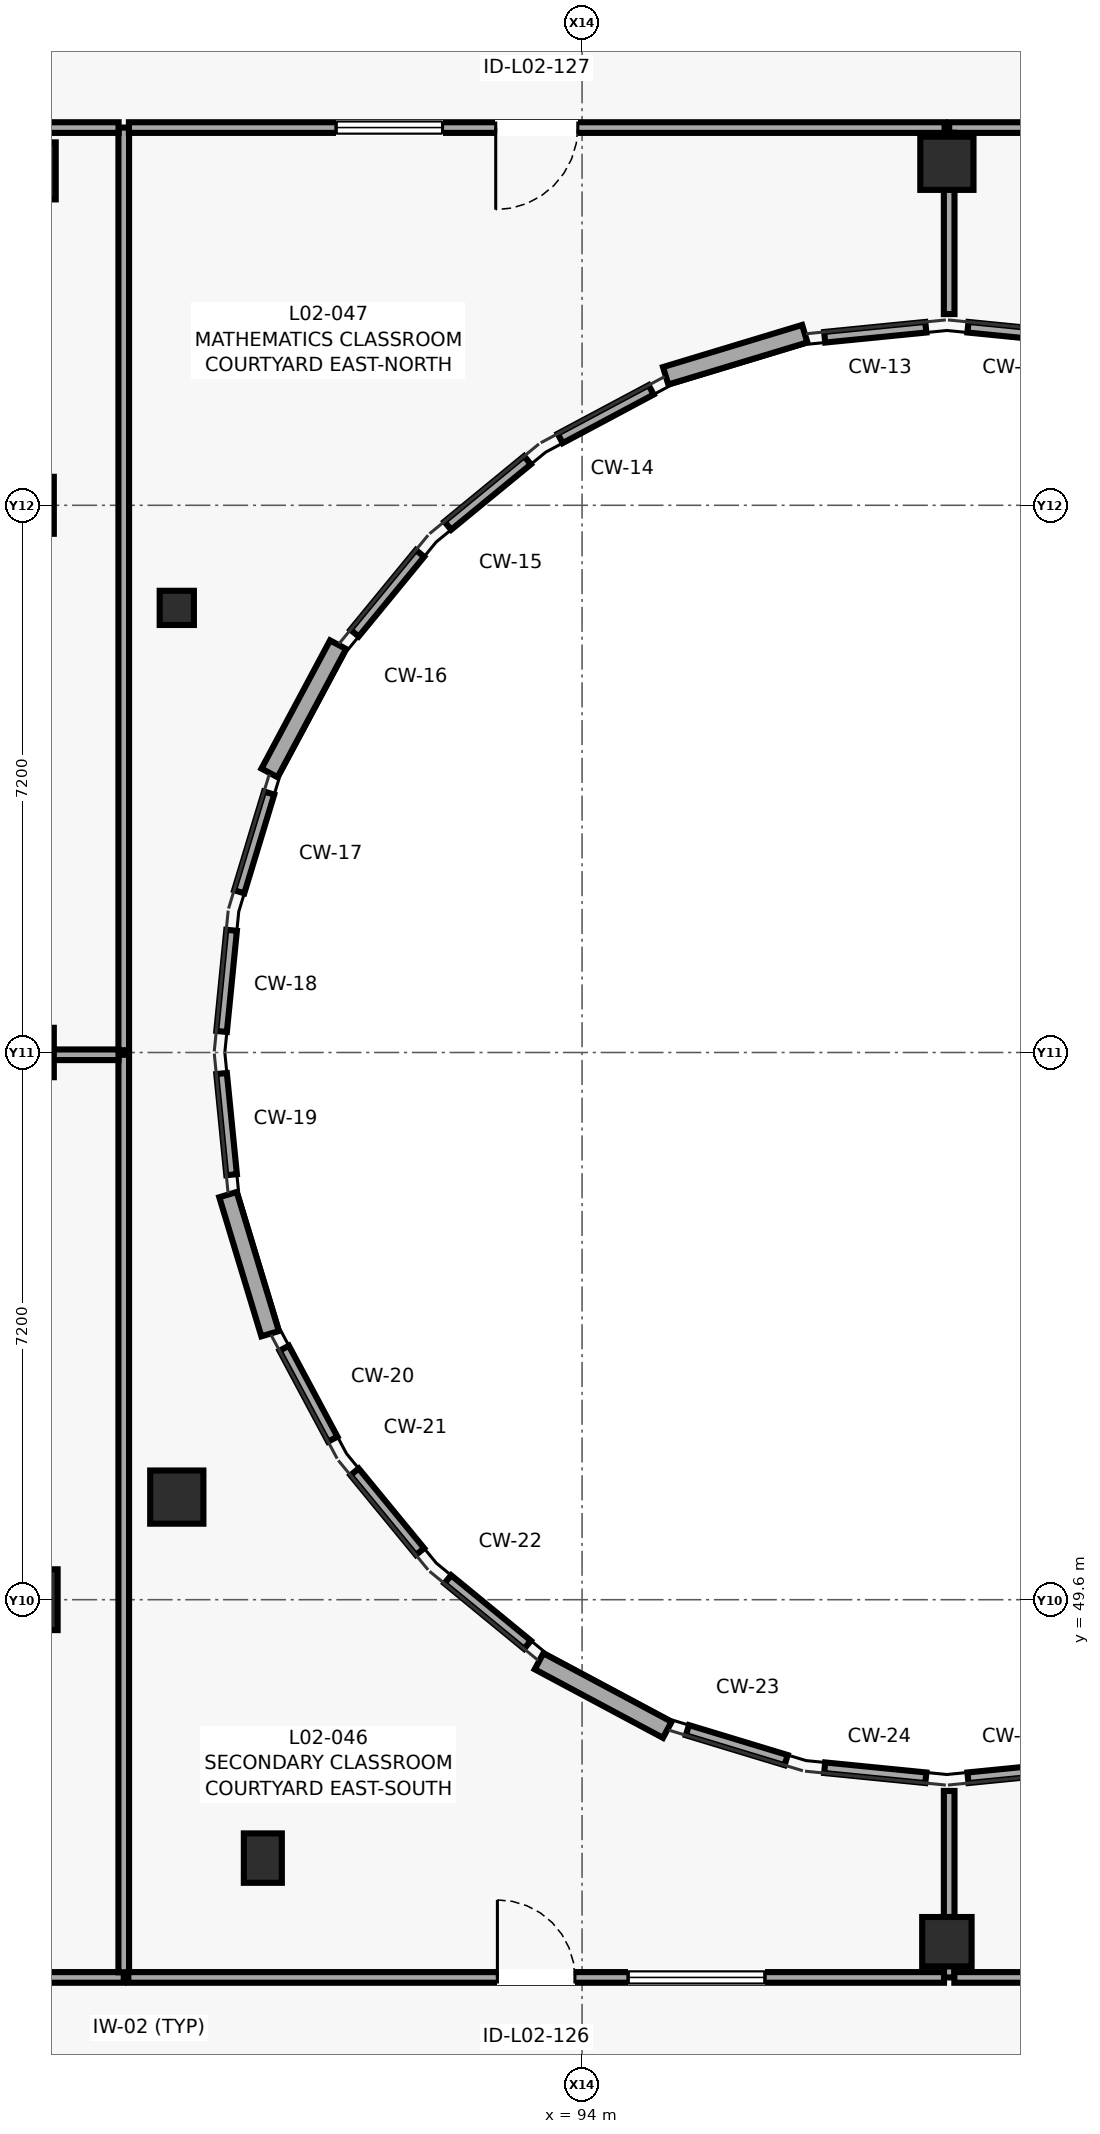
"""IFC4 building model, lengths in metres.
Left out: names, types, materials, properties, quantities, classifications, styles, units other than length and angle.
Written with IfcOpenShell. Run it as: python <this file> out.ifc"""

import sys

from ifc_helpers import new_model, si_unit, direction, frame, frame_2d, origin, origin_2d, place, context, subcontext, project, spatial, rectangle, circle, extrude, element, fill, save


model = new_model("IFC4")
c1 = context("Model", 3, precision=1e-05, world=origin(), true_north=direction((0.0, 1.0)))
c2 = subcontext(c1, "Body", "Model", "MODEL_VIEW")
j1 = project(units=[si_unit("LENGTHUNIT", "METRE"), si_unit("PLANEANGLEUNIT", "RADIAN")], contexts=[c1])
p1 = place(None, origin())
s1 = spatial("IfcSite", under=j1, at=p1, CompositionType="ELEMENT")
p2 = place(p1, origin())
s2 = spatial("IfcBuilding", under=s1, at=p2, CompositionType="ELEMENT")
p3 = place(p2, frame((0.0, 0.0, 8.2)))
s3 = spatial("IfcBuildingStorey", under=s2, at=p3, CompositionType="ELEMENT", Elevation=8.2)
p4 = place(p3, frame((86.8, 49.6, 0.0), z_axis=(0.0, 0.0, 1.0), x_axis=(1.0, 0.0, 0.0)))
e1 = element("IfcColumn", 1, at=p4, inside=s3, PredefinedType="COLUMN", context=c2, shape_type="SweptSolid", body=[
    extrude(rectangle(XDim=0.6, YDim=0.8, at=origin_2d()), origin(), (0.0, 0.0, 1.0), 4.0),
])
p5 = place(p3, frame((86.8, 56.8, 0.0), z_axis=(0.0, 0.0, 1.0), x_axis=(1.0, 0.0, 0.0)))
e2 = element("IfcColumn", 2, at=p5, inside=s3, PredefinedType="COLUMN", context=c2, shape_type="SweptSolid", body=[
    extrude(rectangle(XDim=0.5, YDim=0.65, at=origin_2d()), origin(), (0.0, 0.0, 1.0), 4.0),
])
p6 = place(p3, frame((86.8, 64.0, 0.0), z_axis=(0.0, 0.0, 1.0), x_axis=(1.0, 0.0, 0.0)))
e3 = element("IfcColumn", 3, at=p6, inside=s3, PredefinedType="COLUMN", context=c2, shape_type="SweptSolid", body=[
    extrude(rectangle(XDim=0.5, YDim=0.75, at=origin_2d()), origin(), (0.0, 0.0, 1.0), 4.0),
])
p7 = place(p3, frame((86.8, 68.4, 0.0), z_axis=(0.0, 0.0, 1.0), x_axis=(1.0, 0.0, 0.0)))
e4 = element("IfcColumn", 4, at=p7, inside=s3, PredefinedType="COLUMN", context=c2, shape_type="SweptSolid", body=[
    extrude(rectangle(XDim=0.55, YDim=0.75, at=origin_2d()), origin(), (0.0, 0.0, 1.0), 4.0),
])
p8 = place(p3, frame((88.668, 50.95, 0.0), z_axis=(0.0, 0.0, 1.0), x_axis=(1.0, 0.0, 0.0)))
e5 = element("IfcColumn", 5, at=p8, inside=s3, PredefinedType="COLUMN", context=c2, shape_type="SweptSolid", body=[
    extrude(circle(Radius=0.35, at=origin_2d()), origin(), (0.0, 0.0, 1.0), 4.0),
])
p9 = place(p3, frame((88.668, 62.65, 0.0), z_axis=(0.0, 0.0, 1.0), x_axis=(1.0, 0.0, 0.0)))
e6 = element("IfcColumn", 6, at=p9, inside=s3, PredefinedType="COLUMN", context=c2, shape_type="SweptSolid", body=[
    extrude(circle(Radius=0.225, at=origin_2d()), origin(), (0.0, 0.0, 1.0), 4.0),
])
p10 = place(p3, frame((89.8, 46.2, 0.0), z_axis=(0.0, 0.0, 1.0), x_axis=(1.0, 0.0, 0.0)))
e7 = element("IfcColumn", 7, at=p10, inside=s3, PredefinedType="COLUMN", context=c2, shape_type="SweptSolid", body=[
    extrude(rectangle(XDim=0.5, YDim=0.65, at=origin_2d()), origin(), (0.0, 0.0, 1.0), 4.0),
])
p11 = place(p3, frame((98.8, 45.1, 0.0), z_axis=(0.0, 0.0, 1.0), x_axis=(1.0, 0.0, 0.0)))
e8 = element("IfcColumn", 8, at=p11, inside=s3, PredefinedType="COLUMN", context=c2, shape_type="SweptSolid", body=[
    extrude(circle(Radius=0.325, at=origin_2d()), origin(), (0.0, 0.0, 1.0), 4.0),
])
p12 = place(p3, frame((98.8, 68.5, 0.0), z_axis=(0.0, 0.0, 1.0), x_axis=(1.0, 0.0, 0.0)))
e9 = element("IfcColumn", 9, at=p12, inside=s3, PredefinedType="COLUMN", context=c2, shape_type="SweptSolid", body=[
    extrude(circle(Radius=0.35, at=origin_2d()), origin(), (0.0, 0.0, 1.0), 4.0),
])
p13 = place(p3, frame((96.93, 66.258, 0.0), z_axis=(0.0, 0.0, 1.0), x_axis=(-0.957102771605, -0.289748657608, 0.0)))
e10 = element("IfcWall", 10, at=p13, inside=s3, PredefinedType="SOLIDWALL", context=c2, shape_type="SweptSolid", body=[
    extrude(rectangle(XDim=1.912, YDim=0.24, at=frame_2d((0.956, 0.0))), origin(), (0.0, 0.0, 1.0), 3.78),
])
p14 = place(p3, frame((90.79, 62.166, 0.0), z_axis=(0.0, 0.0, 1.0), x_axis=(-0.471548403175, -0.881840180227, 0.0)))
e11 = element("IfcWall", 11, at=p14, inside=s3, PredefinedType="SOLIDWALL", context=c2, shape_type="SweptSolid", body=[
    extrude(rectangle(XDim=1.913, YDim=0.24, at=frame_2d((0.957, 0.0))), origin(), (0.0, 0.0, 1.0), 3.78),
])
p15 = place(p3, frame((89.342, 54.93, 0.0), z_axis=(0.0, 0.0, 1.0), x_axis=(0.289748657608, -0.957102771605, 0.0)))
e12 = element("IfcWall", 12, at=p15, inside=s3, PredefinedType="SOLIDWALL", context=c2, shape_type="SweptSolid", body=[
    extrude(rectangle(XDim=1.912, YDim=0.24, at=frame_2d((0.956, 0.0))), origin(), (0.0, 0.0, 1.0), 3.78),
])
p16 = place(p3, frame((93.434, 48.79, 0.0), z_axis=(0.0, 0.0, 1.0), x_axis=(0.881840180227, -0.471548403175, 0.0)))
e13 = element("IfcWall", 13, at=p16, inside=s3, PredefinedType="SOLIDWALL", context=c2, shape_type="SweptSolid", body=[
    extrude(rectangle(XDim=1.913, YDim=0.24, at=frame_2d((0.957, 0.0))), origin(), (0.0, 0.0, 1.0), 3.78),
])
p17 = place(p3, frame((79.53, 44.63, 0.0), z_axis=(0.0, 0.0, 1.0), x_axis=(1.0, 0.0, 0.0)))
e14 = element("IfcWall", 14, at=p17, inside=s3, PredefinedType="PARTITIONING", context=c2, shape_type="SweptSolid", body=[
    extrude(rectangle(XDim=8.44, YDim=0.14, at=frame_2d((4.22, 0.0))), origin(), (0.0, 0.0, 1.0), 3.775),
])
p18 = place(p3, frame((87.97, 44.698, 0.0), z_axis=(0.0, 0.0, 1.0), x_axis=(0.0, 1.0, 0.0)))
e15 = element("IfcWall", 15, at=p18, inside=s3, PredefinedType="PARTITIONING", context=c2, shape_type="SweptSolid", body=[
    extrude(rectangle(XDim=12.072, YDim=0.14, at=frame_2d((6.036, 0.0))), origin(), (0.0, 0.0, 1.0), 3.775),
])
p19 = place(p3, frame((87.902, 56.77, 0.0), z_axis=(0.0, 0.0, 1.0), x_axis=(-1.0, 0.0, 0.0)))
e16 = element("IfcWall", 16, at=p19, inside=s3, PredefinedType="PARTITIONING", context=c2, shape_type="SweptSolid", body=[
    extrude(rectangle(XDim=8.372, YDim=0.14, at=frame_2d((4.186, 0.0))), origin(), (0.0, 0.0, 1.0), 2.975),
])
p20 = place(p3, frame((87.97, 56.83, 0.0), z_axis=(0.0, 0.0, 1.0), x_axis=(0.0, 1.0, 0.0)))
e17 = element("IfcWall", 17, at=p20, inside=s3, PredefinedType="PARTITIONING", context=c2, shape_type="SweptSolid", body=[
    extrude(rectangle(XDim=12.14, YDim=0.14, at=frame_2d((6.07, 0.0))), origin(), (0.0, 0.0, 1.0), 3.775),
])
p21 = place(p3, frame((87.902, 68.97, 0.0), z_axis=(0.0, 0.0, 1.0), x_axis=(-1.0, 0.0, 0.0)))
e18 = element("IfcWall", 18, at=p21, inside=s3, PredefinedType="PARTITIONING", context=c2, shape_type="SweptSolid", body=[
    extrude(rectangle(XDim=8.304, YDim=0.14, at=frame_2d((4.152, 0.0))), origin(), (0.0, 0.0, 1.0), 3.775),
])
p22 = place(p3, frame((100.408, 47.389, 0.0), z_axis=(0.0, 0.0, 1.0), x_axis=(-0.99513072014, -0.098563937798, 0.0)))
e19 = element("IfcWall", 19, at=p22, inside=s3, PredefinedType="PARTITIONING", context=c2, shape_type="SweptSolid", body=[
    extrude(rectangle(XDim=1.338, YDim=0.14, at=frame_2d((0.669, 0.0))), origin(), (0.0, 0.0, 1.0), 3.775),
])
p23 = place(p3, frame((98.83, 47.084, 0.0), z_axis=(0.0, 0.0, 1.0), x_axis=(0.0, -1.0, 0.0)))
e20 = element("IfcWall", 20, at=p23, inside=s3, PredefinedType="PARTITIONING", context=c2, shape_type="SweptSolid", body=[
    extrude(rectangle(XDim=2.454, YDim=0.14, at=frame_2d((1.227, 0.0))), origin(), (0.0, 0.0, 1.0), 3.775),
])
p24 = place(p3, frame((98.898, 44.63, 0.0), z_axis=(0.0, 0.0, 1.0), x_axis=(1.0, 0.0, 0.0)))
e21 = element("IfcWall", 21, at=p24, inside=s3, PredefinedType="PARTITIONING", context=c2, shape_type="SweptSolid", body=[
    extrude(rectangle(XDim=8.939, YDim=0.14, at=frame_2d((4.469, 0.0))), origin(), (0.0, 0.0, 1.0), 3.775),
])
p25 = place(p24, frame((3.945, 0.0, 0.0)))
e22 = element("IfcOpeningElement", 22, at=p25, cuts=e21, PredefinedType="OPENING", context=c2, shape_type="SweptSolid", body=[
    extrude(rectangle(XDim=1.05, YDim=2.1, at=frame_2d((0.525, 1.05))), frame((0.0, 0.08, 0.0), z_axis=(0.0, -1.0, 0.0), x_axis=(1.0, 0.0, 0.0)), (0.0, 0.0, 1.0), 0.16),
])
p26 = place(p24, frame((5.695, 0.0, 1.05)))
e23 = element("IfcOpeningElement", 23, at=p26, cuts=e21, PredefinedType="OPENING", context=c2, shape_type="SweptSolid", body=[
    extrude(rectangle(XDim=1.4, YDim=1.05, at=frame_2d((0.7, 0.525))), frame((0.0, 0.08, 0.0), z_axis=(0.0, -1.0, 0.0), x_axis=(1.0, 0.0, 0.0)), (0.0, 0.0, 1.0), 0.16),
])
p27 = place(p3, frame((112.902, 68.97, 0.0), z_axis=(0.0, 0.0, 1.0), x_axis=(-1.0, 0.0, 0.0)))
e24 = element("IfcWall", 24, at=p27, inside=s3, PredefinedType="PARTITIONING", context=c2, shape_type="SweptSolid", body=[
    extrude(rectangle(XDim=14.072, YDim=0.14, at=frame_2d((7.036, 0.0))), origin(), (0.0, 0.0, 1.0), 3.775),
])
p28 = place(p27, frame((6.546, 0.0, 0.0)))
e25 = element("IfcOpeningElement", 25, at=p28, cuts=e24, PredefinedType="OPENING", context=c2, shape_type="SweptSolid", body=[
    extrude(rectangle(XDim=0.98, YDim=2.12, at=frame_2d((0.49, 1.06))), frame((0.0, 0.08, 0.0), z_axis=(0.0, -1.0, 0.0), x_axis=(1.0, 0.0, 0.0)), (0.0, 0.0, 1.0), 0.16),
])
p29 = place(p27, frame((8.226, 0.0, 1.05)))
e26 = element("IfcOpeningElement", 26, at=p29, cuts=e24, PredefinedType="OPENING", context=c2, shape_type="SweptSolid", body=[
    extrude(rectangle(XDim=1.6, YDim=1.1, at=frame_2d((0.8, 0.55))), frame((0.0, 0.08, 0.0), z_axis=(0.0, -1.0, 0.0), x_axis=(1.0, 0.0, 0.0)), (0.0, 0.0, 1.0), 0.16),
])
p30 = place(p3, frame((98.83, 68.902, 0.0), z_axis=(0.0, 0.0, 1.0), x_axis=(0.0, -1.0, 0.0)))
e27 = element("IfcWall", 27, at=p30, inside=s3, PredefinedType="PARTITIONING", context=c2, shape_type="SweptSolid", body=[
    extrude(rectangle(XDim=2.386, YDim=0.14, at=frame_2d((1.193, 0.0))), origin(), (0.0, 0.0, 1.0), 3.775),
])
p31 = place(p3, frame((99.077, 66.343, 0.0), z_axis=(0.0, 0.0, 1.0), x_axis=(0.995112801185, -0.098744685517, 0.0)))
e28 = element("IfcWall", 28, at=p31, inside=s3, PredefinedType="PARTITIONING", context=c2, shape_type="SweptSolid", body=[
    extrude(rectangle(XDim=1.338, YDim=0.14, at=frame_2d((0.669, 0.0))), origin(), (0.0, 0.0, 1.0), 3.775),
])
p32 = place(p3, frame((96.685, 47.489, 0.0), z_axis=(0.0, 0.0, 1.0), x_axis=(-0.956945716193, 0.290266939661, 0.0)))
e29 = element("IfcWall", 29, at=p32, inside=s3, PredefinedType="PARTITIONING", context=c2, shape_type="SweptSolid", body=[
    extrude(rectangle(XDim=1.357, YDim=0.14, at=frame_2d((0.679, 0.0))), origin(), (0.0, 0.0, 1.0), 3.775),
])
for number, where, z_axis, x_axis in (
    (30, (93.282, 49.007, 0.0), (0.0, 0.0, 1.0), (-0.773, 0.634, 0.0)),
    (31, (91.868, 50.233, 0.0), (0.0, 0.0, 1.0), (-0.634, 0.773, 0.0)),
    (32, (90.72, 51.712, 0.0), (0.0, 0.0, 1.0), (-0.471, 0.882, 0.0)),
):
    element("IfcWall", number, at=place(p3, frame(where, z_axis=z_axis, x_axis=x_axis)), inside=s3, PredefinedType="PARTITIONING", context=c2, shape_type="SweptSolid", body=[
        extrude(rectangle(XDim=1.357, YDim=0.14, at=frame_2d((0.678, 0.0))), origin(), (0.0, 0.0, 1.0), 3.775),
    ])
p33 = place(p3, frame((89.389, 55.192, 0.0), z_axis=(0.0, 0.0, 1.0), x_axis=(-0.098563937798, 0.99513072014, 0.0)))
e33 = element("IfcWall", 33, at=p33, inside=s3, PredefinedType="PARTITIONING", context=c2, shape_type="SweptSolid", body=[
    extrude(rectangle(XDim=1.338, YDim=0.14, at=frame_2d((0.669, 0.0))), origin(), (0.0, 0.0, 1.0), 3.775),
])
p34 = place(p3, frame((88.03, 44.63, 0.0), z_axis=(0.0, 0.0, 1.0), x_axis=(1.0, 0.0, 0.0)))
e34 = element("IfcWall", 34, at=p34, inside=s3, PredefinedType="PARTITIONING", context=c2, shape_type="SweptSolid", body=[
    extrude(rectangle(XDim=10.732, YDim=0.14, at=frame_2d((5.366, 0.0))), origin(), (0.0, 0.0, 1.0), 3.775),
])
p35 = place(p34, frame((4.856, 0.0, 0.0)))
e35 = element("IfcOpeningElement", 35, at=p35, cuts=e34, PredefinedType="OPENING", context=c2, shape_type="SweptSolid", body=[
    extrude(rectangle(XDim=1.02, YDim=2.14, at=frame_2d((0.51, 1.07))), frame((0.0, 0.08, 0.0), z_axis=(0.0, -1.0, 0.0), x_axis=(1.0, 0.0, 0.0)), (0.0, 0.0, 1.0), 0.16),
])
p36 = place(p34, frame((6.576, 0.0, 1.05)))
e36 = element("IfcOpeningElement", 36, at=p36, cuts=e34, PredefinedType="OPENING", context=c2, shape_type="SweptSolid", body=[
    extrude(rectangle(XDim=1.8, YDim=1.2, at=frame_2d((0.9, 0.6))), frame((0.0, 0.08, 0.0), z_axis=(0.0, -1.0, 0.0), x_axis=(1.0, 0.0, 0.0)), (0.0, 0.0, 1.0), 0.16),
])
for number, where, z_axis, x_axis in (
    (37, (98.523, 47.257, 0.0), (0.0, 0.0, 1.0), (-0.995, 0.099, 0.0)),
    (38, (89.257, 57.077, 0.0), (0.0, 0.0, 1.0), (0.099, 0.995, 0.0)),
):
    element("IfcWall", number, at=place(p3, frame(where, z_axis=z_axis, x_axis=x_axis)), inside=s3, PredefinedType="PARTITIONING", context=c2, shape_type="SweptSolid", body=[
        extrude(rectangle(XDim=1.338, YDim=0.14, at=frame_2d((0.669, 0.0))), origin(), (0.0, 0.0, 1.0), 3.775),
    ])
p37 = place(p3, frame((89.489, 58.915, 0.0), z_axis=(0.0, 0.0, 1.0), x_axis=(0.290266939661, 0.956945716193, 0.0)))
e39 = element("IfcWall", 39, at=p37, inside=s3, PredefinedType="PARTITIONING", context=c2, shape_type="SweptSolid", body=[
    extrude(rectangle(XDim=1.357, YDim=0.14, at=frame_2d((0.679, 0.0))), origin(), (0.0, 0.0, 1.0), 3.775),
])
p38 = place(p3, frame((91.007, 62.318, 0.0), z_axis=(0.0, 0.0, 1.0), x_axis=(0.634432410055, 0.772978341916, 0.0)))
e40 = element("IfcWall", 40, at=p38, inside=s3, PredefinedType="PARTITIONING", context=c2, shape_type="SweptSolid", body=[
    extrude(rectangle(XDim=1.357, YDim=0.14, at=frame_2d((0.678, 0.0))), origin(), (0.0, 0.0, 1.0), 3.775),
])
p39 = place(p3, frame((92.233, 63.732, 0.0), z_axis=(0.0, 0.0, 1.0), x_axis=(0.772962530207, 0.634451674201, 0.0)))
e41 = element("IfcWall", 41, at=p39, inside=s3, PredefinedType="PARTITIONING", context=c2, shape_type="SweptSolid", body=[
    extrude(rectangle(XDim=1.357, YDim=0.14, at=frame_2d((0.679, 0.0))), origin(), (0.0, 0.0, 1.0), 3.775),
])
p40 = place(p3, frame((93.712, 64.88, 0.0), z_axis=(0.0, 0.0, 1.0), x_axis=(0.882123740571, 0.471017734614, 0.0)))
e42 = element("IfcWall", 42, at=p40, inside=s3, PredefinedType="PARTITIONING", context=c2, shape_type="SweptSolid", body=[
    extrude(rectangle(XDim=1.357, YDim=0.14, at=frame_2d((0.678, 0.0))), origin(), (0.0, 0.0, 1.0), 3.775),
])
p41 = place(p3, frame((97.192, 66.211, 0.0), z_axis=(0.0, 0.0, 1.0), x_axis=(0.995112801185, 0.098744685517, 0.0)))
e43 = element("IfcWall", 43, at=p41, inside=s3, PredefinedType="PARTITIONING", context=c2, shape_type="SweptSolid", body=[
    extrude(rectangle(XDim=1.338, YDim=0.14, at=frame_2d((0.669, 0.0))), origin(), (0.0, 0.0, 1.0), 3.775),
])
p42 = place(p3, frame((98.77, 68.97, 0.0), z_axis=(0.0, 0.0, 1.0), x_axis=(-1.0, 0.0, 0.0)))
e44 = element("IfcWall", 44, at=p42, inside=s3, PredefinedType="PARTITIONING", context=c2, shape_type="SweptSolid", body=[
    extrude(rectangle(XDim=10.732, YDim=0.14, at=frame_2d((5.366, 0.0))), origin(), (0.0, 0.0, 1.0), 3.775),
])
p43 = place(p42, frame((4.826, 0.0, 0.0)))
e45 = element("IfcOpeningElement", 45, at=p43, cuts=e44, PredefinedType="OPENING", context=c2, shape_type="SweptSolid", body=[
    extrude(rectangle(XDim=1.08, YDim=2.16, at=frame_2d((0.54, 1.08))), frame((0.0, 0.08, 0.0), z_axis=(0.0, -1.0, 0.0), x_axis=(1.0, 0.0, 0.0)), (0.0, 0.0, 1.0), 0.16),
])
p44 = place(p42, frame((6.606, 0.0, 1.05)))
e46 = element("IfcOpeningElement", 46, at=p44, cuts=e44, PredefinedType="OPENING", context=c2, shape_type="SweptSolid", body=[
    extrude(rectangle(XDim=1.4, YDim=1.05, at=frame_2d((0.7, 0.525))), frame((0.0, 0.08, 0.0), z_axis=(0.0, -1.0, 0.0), x_axis=(1.0, 0.0, 0.0)), (0.0, 0.0, 1.0), 0.16),
])
p45 = place(p35, origin())
e47 = element("IfcDoor", 47, at=p45, inside=s3, OperationType="SINGLE_SWING_LEFT", PredefinedType="DOOR", context=c2, shape_type="SweptSolid", body=[
    extrude(rectangle(XDim=1.02, YDim=2.14, at=frame_2d((0.51, 1.07))), frame((0.0, 0.025, 0.0), z_axis=(0.0, -1.0, 0.0), x_axis=(1.0, 0.0, 0.0)), (0.0, 0.0, 1.0), 0.05),
])
fill(e35, e47)
p46 = place(p36, origin())
e48 = element("IfcWindow", 48, at=p46, inside=s3, PartitioningType="SINGLE_PANEL", PredefinedType="WINDOW", context=c2, shape_type="SweptSolid", body=[
    extrude(rectangle(XDim=1.8, YDim=1.2, at=frame_2d((0.9, 0.6))), frame((0.0, 0.03, 0.0), z_axis=(0.0, -1.0, 0.0), x_axis=(1.0, 0.0, 0.0)), (0.0, 0.0, 1.0), 0.06),
])
fill(e36, e48)
p47 = place(p43, origin())
e49 = element("IfcDoor", 49, at=p47, inside=s3, OperationType="SINGLE_SWING_RIGHT", PredefinedType="DOOR", context=c2, shape_type="SweptSolid", body=[
    extrude(rectangle(XDim=1.08, YDim=2.16, at=frame_2d((0.54, 1.08))), frame((0.0, 0.025, 0.0), z_axis=(0.0, -1.0, 0.0), x_axis=(1.0, 0.0, 0.0)), (0.0, 0.0, 1.0), 0.05),
])
fill(e45, e49)
p48 = place(p44, origin())
e50 = element("IfcWindow", 50, at=p48, inside=s3, PartitioningType="SINGLE_PANEL", PredefinedType="WINDOW", context=c2, shape_type="SweptSolid", body=[
    extrude(rectangle(XDim=1.4, YDim=1.05, at=frame_2d((0.7, 0.525))), frame((0.0, 0.03, 0.0), z_axis=(0.0, -1.0, 0.0), x_axis=(1.0, 0.0, 0.0)), (0.0, 0.0, 1.0), 0.06),
])
fill(e46, e50)
save(model, sys.argv[1])
